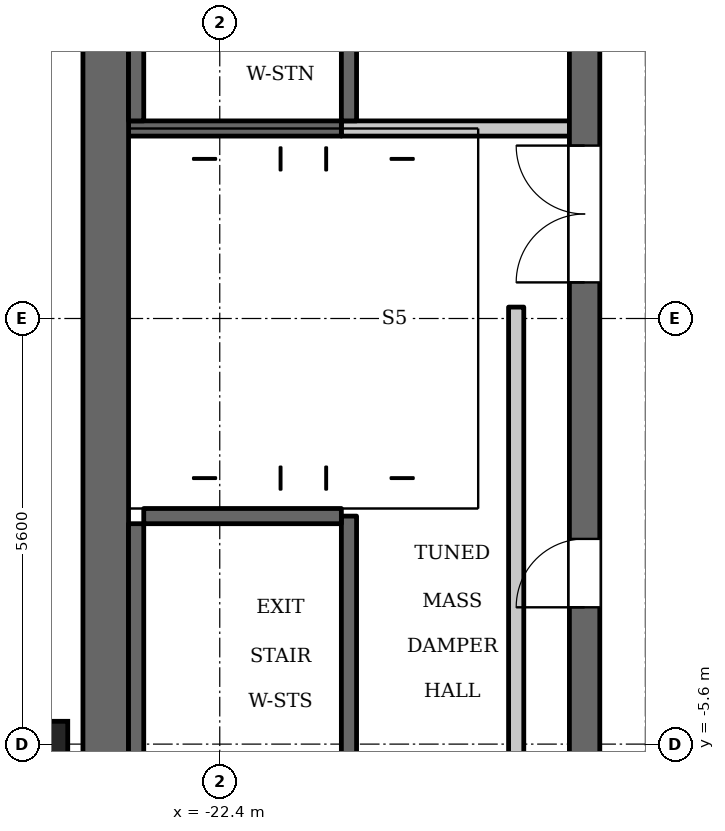
"""IFC4 building model, lengths in metres.
Left out: names, types, materials, properties, quantities, classifications, styles, units other than length and angle.
Written with IfcOpenShell. Run it as: python <this file> out.ifc"""

import sys

from ifc_helpers import new_model, si_unit, direction, frame, frame_2d, origin, origin_2d, place, context, subcontext, project, spatial, rectangle, extrude, element, fill, save


model = new_model("IFC4")
c1 = context("Model", 3, precision=1e-05, world=origin(), true_north=direction((0.0, 1.0)))
c2 = subcontext(c1, "Body", "Model", "MODEL_VIEW")
j1 = project(units=[si_unit("LENGTHUNIT", "METRE"), si_unit("PLANEANGLEUNIT", "RADIAN")], contexts=[c1])
p1 = place(None, origin())
s1 = spatial("IfcSite", under=j1, at=p1, CompositionType="ELEMENT")
p2 = place(p1, origin())
s2 = spatial("IfcBuilding", under=s1, at=p2, CompositionType="ELEMENT")
p3 = place(p2, frame((0.0, 0.0, 317.4)))
s3 = spatial("IfcBuildingStorey", under=s2, at=p3, CompositionType="ELEMENT", Elevation=317.4)
p4 = place(p3, frame((-24.7, -5.6, 0.0), z_axis=(0.0, 0.0, 1.0), x_axis=(1.0, 0.0, 0.0)))
e1 = element("IfcColumn", 1, at=p4, inside=s3, PredefinedType="COLUMN", context=c2, shape_type="SweptSolid", body=[
    extrude(rectangle(XDim=0.6, YDim=0.6, at=origin_2d()), origin(), (0.0, 0.0, 1.0), 3.5),
])
for number, where, z_axis, x_axis in (
    (2, (-20.7, 2.6, 0.0), (0.0, 0.0, 1.0), (0.0, 1.0, 0.0)),
    (3, (-20.7, -9.6, 0.0), (0.0, 0.0, 1.0), (0.0, 1.0, 0.0)),
):
    element("IfcWall", number, at=place(p3, frame(where, z_axis=z_axis, x_axis=x_axis)), inside=s3, PredefinedType="SHEAR", context=c2, shape_type="SweptSolid", body=[
        extrude(rectangle(XDim=7.0, YDim=0.2, at=frame_2d((3.5, 0.0))), origin(), (0.0, 0.0, 1.0), 3.2),
    ])
p5 = place(p3, frame((-20.8, 2.5, 0.0), z_axis=(0.0, 0.0, 1.0), x_axis=(-1.0, 0.0, 0.0)))
e4 = element("IfcWall", 4, at=p5, inside=s3, PredefinedType="SHEAR", context=c2, shape_type="SweptSolid", body=[
    extrude(rectangle(XDim=2.8, YDim=0.2, at=frame_2d((1.4, 0.0))), origin(), (0.0, 0.0, 1.0), 3.2),
])
p6 = place(p3, frame((-18.5, -6.85, 0.0), z_axis=(0.0, 0.0, 1.0), x_axis=(0.0, 1.0, 0.0)))
e5 = element("IfcWall", 5, at=p6, inside=s3, PredefinedType="PARTITIONING", context=c2, shape_type="SweptSolid", body=[
    extrude(rectangle(XDim=7.0, YDim=0.2, at=frame_2d((3.5, 0.0))), origin(), (0.0, 0.0, 1.0), 3.2),
])
p7 = place(p3, frame((-17.6, -12.6, 0.0), z_axis=(0.0, 0.0, 1.0), x_axis=(0.0, 1.0, 0.0)))
e6 = element("IfcWall", 6, at=p7, inside=s3, PredefinedType="SHEAR", context=c2, shape_type="SweptSolid", body=[
    extrude(rectangle(XDim=25.2, YDim=0.4, at=frame_2d((12.6, 0.0))), origin(), (0.0, 0.0, 1.0), 3.2),
])
p8 = place(p7, frame((8.8, 0.0, 0.0)))
e7 = element("IfcOpeningElement", 7, at=p8, cuts=e6, PredefinedType="OPENING", context=c2, shape_type="SweptSolid", body=[
    extrude(rectangle(XDim=0.9, YDim=2.1, at=frame_2d((0.45, 1.05))), frame((0.0, 0.21, 0.0), z_axis=(0.0, -1.0, 0.0), x_axis=(1.0, 0.0, 0.0)), (0.0, 0.0, 1.0), 0.42),
])
p9 = place(p7, frame((17.05, 0.0, 0.0)))
e8 = element("IfcOpeningElement", 8, at=p9, cuts=e6, PredefinedType="OPENING", context=c2, shape_type="SweptSolid", body=[
    extrude(rectangle(XDim=0.9, YDim=2.1, at=frame_2d((0.45, 1.05))), frame((0.0, 0.21, 0.0), z_axis=(0.0, -1.0, 0.0), x_axis=(1.0, 0.0, 0.0)), (0.0, 0.0, 1.0), 0.42),
])
p10 = place(p7, frame((23.25, 0.0, 0.0)))
e9 = element("IfcOpeningElement", 9, at=p10, cuts=e6, PredefinedType="OPENING", context=c2, shape_type="SweptSolid", body=[
    extrude(rectangle(XDim=1.1, YDim=2.1, at=frame_2d((0.55, 1.05))), frame((0.0, 0.21, 0.0), z_axis=(0.0, -1.0, 0.0), x_axis=(1.0, 0.0, 0.0)), (0.0, 0.0, 1.0), 0.42),
])
p11 = place(p7, frame((0.85, 0.0, 0.0)))
e10 = element("IfcOpeningElement", 10, at=p11, cuts=e6, PredefinedType="OPENING", context=c2, shape_type="SweptSolid", body=[
    extrude(rectangle(XDim=1.1, YDim=2.1, at=frame_2d((0.55, 1.05))), frame((0.0, 0.21, 0.0), z_axis=(0.0, -1.0, 0.0), x_axis=(1.0, 0.0, 0.0)), (0.0, 0.0, 1.0), 0.42),
])
p12 = place(p7, frame((13.075, 0.0, 0.0)))
e11 = element("IfcOpeningElement", 11, at=p12, cuts=e6, PredefinedType="OPENING", context=c2, shape_type="SweptSolid", body=[
    extrude(rectangle(XDim=1.8, YDim=2.1, at=frame_2d((0.9, 1.05))), frame((0.0, 0.21, 0.0), z_axis=(0.0, -1.0, 0.0), x_axis=(1.0, 0.0, 0.0)), (0.0, 0.0, 1.0), 0.42),
])
p13 = place(p3, frame((-23.9, -12.6, 0.0), z_axis=(0.0, 0.0, 1.0), x_axis=(0.0, 1.0, 0.0)))
e12 = element("IfcWall", 12, at=p13, inside=s3, PredefinedType="SHEAR", context=c2, shape_type="SweptSolid", body=[
    extrude(rectangle(XDim=25.2, YDim=0.6, at=frame_2d((12.6, 0.0))), origin(), (0.0, 0.0, 1.0), 3.2),
])
p14 = place(p3, frame((-17.8, 2.5, 0.0), z_axis=(0.0, 0.0, 1.0), x_axis=(-1.0, 0.0, 0.0)))
e13 = element("IfcWall", 13, at=p14, inside=s3, PredefinedType="PARTITIONING", context=c2, shape_type="SweptSolid", body=[
    extrude(rectangle(XDim=3.0, YDim=0.2, at=frame_2d((1.5, 0.0))), origin(), (0.0, 0.0, 1.0), 3.2),
])
p15 = place(p3, frame((-23.5, 2.6, 0.0), z_axis=(0.0, 0.0, 1.0), x_axis=(0.0, 1.0, 0.0)))
e14 = element("IfcWall", 14, at=p15, inside=s3, PredefinedType="SHEAR", context=c2, shape_type="SweptSolid", body=[
    extrude(rectangle(XDim=7.0, YDim=0.2, at=frame_2d((3.5, 0.0))), origin(), (0.0, 0.0, 1.0), 3.2),
])
p16 = place(p3, frame((-23.5, -9.6, 0.0), z_axis=(0.0, 0.0, 1.0), x_axis=(0.0, 1.0, 0.0)))
e15 = element("IfcWall", 15, at=p16, inside=s3, PredefinedType="SHEAR", context=c2, shape_type="SweptSolid", body=[
    extrude(rectangle(XDim=6.9, YDim=0.2, at=frame_2d((3.45, 0.0))), origin(), (0.0, 0.0, 1.0), 3.2),
])
p17 = place(p3, frame((-20.8, -2.6, 0.0), z_axis=(0.0, 0.0, 1.0), x_axis=(-1.0, 0.0, 0.0)))
e16 = element("IfcWall", 16, at=p17, inside=s3, PredefinedType="SHEAR", context=c2, shape_type="SweptSolid", body=[
    extrude(rectangle(XDim=2.6, YDim=0.2, at=frame_2d((1.3, 0.0))), origin(), (0.0, 0.0, 1.0), 3.2),
])
p18 = place(p8, origin())
e17 = element("IfcDoor", 17, at=p18, inside=s3, OperationType="SINGLE_SWING_RIGHT", PredefinedType="DOOR", context=c2, shape_type="SweptSolid", body=[
    extrude(rectangle(XDim=0.9, YDim=2.1, at=frame_2d((0.45, 1.05))), frame((0.0, 0.025, 0.0), z_axis=(0.0, -1.0, 0.0), x_axis=(1.0, 0.0, 0.0)), (0.0, 0.0, 1.0), 0.05),
])
fill(e7, e17)
p19 = place(p12, origin())
e18 = element("IfcDoor", 18, at=p19, inside=s3, OperationType="DOUBLE_DOOR_SINGLE_SWING", PredefinedType="DOOR", context=c2, shape_type="SweptSolid", body=[
    extrude(rectangle(XDim=1.8, YDim=2.1, at=frame_2d((0.9, 1.05))), frame((0.0, 0.025, 0.0), z_axis=(0.0, -1.0, 0.0), x_axis=(1.0, 0.0, 0.0)), (0.0, 0.0, 1.0), 0.05),
])
fill(e11, e18)
save(model, sys.argv[1])
